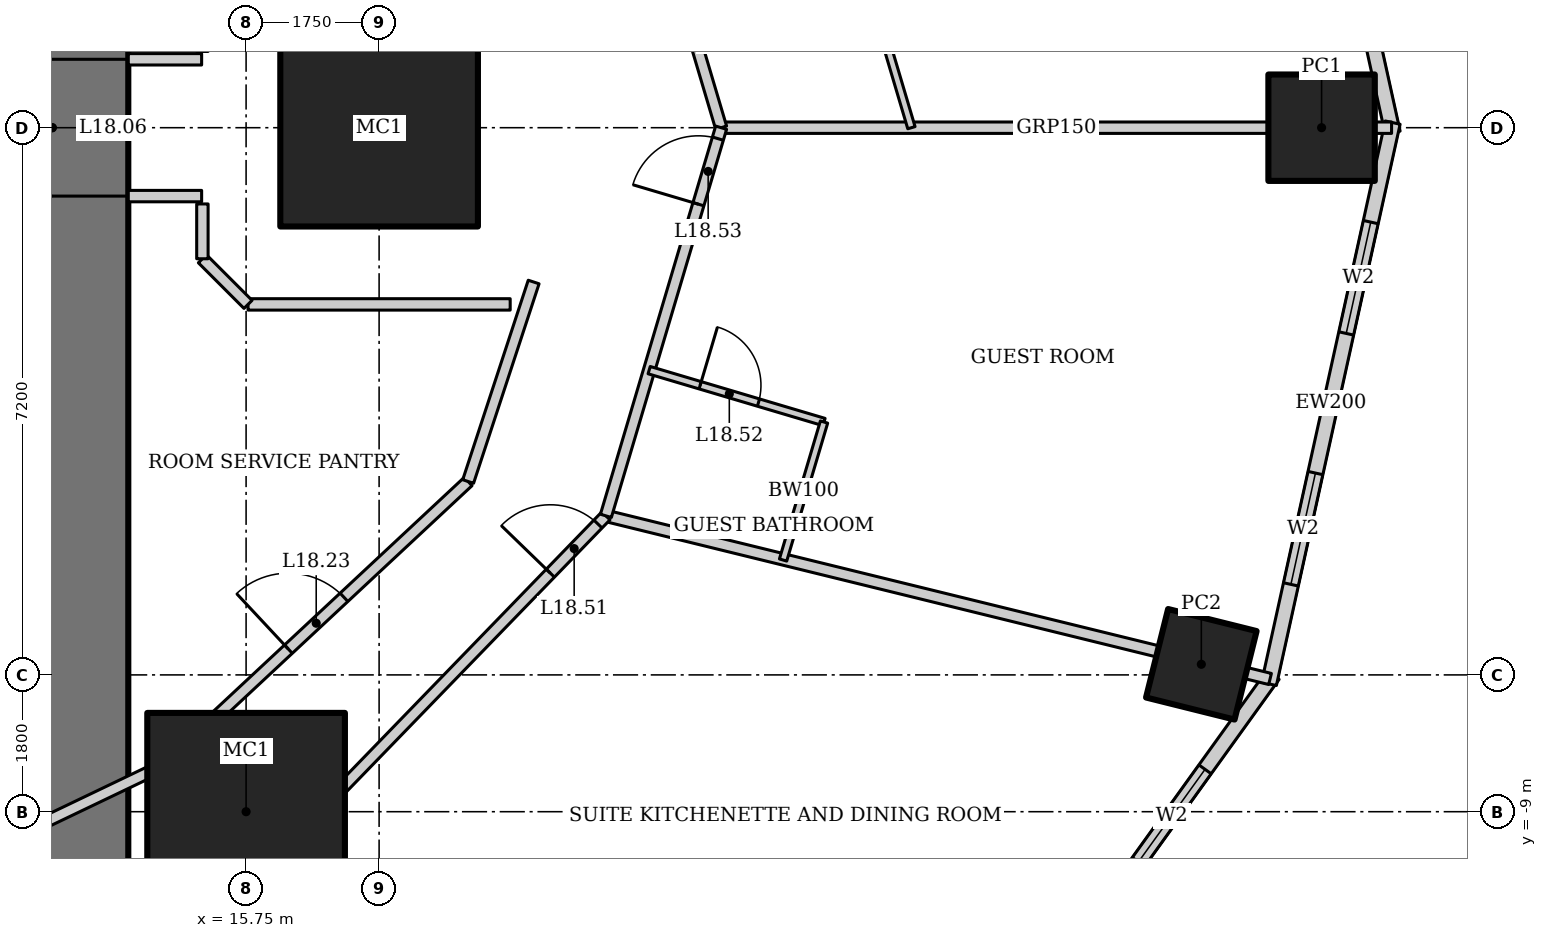
"""IFC4 building model, lengths in metres.
Left out: names, types, materials, properties, quantities, classifications, styles, units other than length and angle.
Written with IfcOpenShell. Run it as: python <this file> out.ifc"""

import sys

from ifc_helpers import new_model, si_unit, direction, frame, frame_2d, origin, origin_2d, place, context, subcontext, project, spatial, rectangle, hollow_rectangle, extrude, element, fill, save


model = new_model("IFC4")
c1 = context("Model", 3, precision=1e-05, world=origin(), true_north=direction((0.0, 1.0)))
c2 = subcontext(c1, "Body", "Model", "MODEL_VIEW")
j1 = project(units=[si_unit("LENGTHUNIT", "METRE"), si_unit("PLANEANGLEUNIT", "RADIAN")], contexts=[c1])
p1 = place(None, origin())
s1 = spatial("IfcSite", under=j1, at=p1, CompositionType="ELEMENT")
p2 = place(p1, origin())
s2 = spatial("IfcBuilding", under=s1, at=p2, CompositionType="ELEMENT")
p3 = place(p2, frame((0.0, 0.0, 80.2)))
s3 = spatial("IfcBuildingStorey", under=s2, at=p3, CompositionType="ELEMENT", Elevation=80.2)
for number, where, z_axis, x_axis in (
    (1, (17.5, 0.0, 0.0), (0.0, 0.0, 1.0), (1.0, 0.0, 0.0)),
    (2, (15.75, -9.0, 0.0), (0.0, 0.0, 1.0), (1.0, 0.0, 0.0)),
):
    element("IfcColumn", number, at=place(p3, frame(where, z_axis=z_axis, x_axis=x_axis)), inside=s3, PredefinedType="COLUMN", context=c2, shape_type="SweptSolid", body=[
        extrude(hollow_rectangle(XDim=2.6, YDim=2.6, WallThickness=0.13, at=origin_2d()), origin(), (0.0, 0.0, 1.0), 3.6),
    ])
p4 = place(p3, frame((29.9, 0.0, 0.0), z_axis=(0.0, 0.0, 1.0), x_axis=(1.0, 0.0, 0.0)))
e3 = element("IfcColumn", 3, at=p4, inside=s3, PredefinedType="COLUMN", context=c2, shape_type="SweptSolid", body=[
    extrude(hollow_rectangle(XDim=1.4, YDim=1.4, WallThickness=0.1, at=origin_2d()), origin(), (0.0, 0.0, 1.0), 3.6),
])
p5 = place(p3, frame((28.318, -7.06, 0.0), z_axis=(0.0, 0.0, 1.0), x_axis=(0.2419218956, 0.970295726276, 0.0)))
e4 = element("IfcColumn", 4, at=p5, inside=s3, PredefinedType="COLUMN", context=c2, shape_type="SweptSolid", body=[
    extrude(hollow_rectangle(XDim=1.2, YDim=1.2, WallThickness=0.1, at=origin_2d()), origin(), (0.0, 0.0, 1.0), 3.6),
])
p6 = place(p3, frame((13.2, -13.0, 0.0), z_axis=(0.0, 0.0, 1.0), x_axis=(0.0, 1.0, 0.0)))
e5 = element("IfcWall", 5, at=p6, inside=s3, PredefinedType="SHEAR", context=c2, shape_type="SweptSolid", body=[
    extrude(rectangle(XDim=26.0, YDim=2.0, at=frame_2d((13.0, 0.0))), origin(), (0.0, 0.0, 1.0), 3.6),
])
p7 = place(p6, frame((12.1, 0.0, 0.0)))
e6 = element("IfcOpeningElement", 6, at=p7, cuts=e5, PredefinedType="OPENING", context=c2, shape_type="SweptSolid", body=[
    extrude(rectangle(XDim=1.8, YDim=2.1, at=frame_2d((0.9, 1.05))), frame((0.0, 1.01, 0.0), z_axis=(0.0, -1.0, 0.0), x_axis=(1.0, 0.0, 0.0)), (0.0, 0.0, 1.0), 2.02),
])
p8 = place(p3, frame((30.835, -0.067, 0.0), z_axis=(0.0, 0.0, 1.0), x_axis=(-0.215238065514, 0.976561608478, 0.0)))
e7 = element("IfcWall", 7, at=p8, inside=s3, PredefinedType="SOLIDWALL", context=c2, shape_type="SweptSolid", body=[
    extrude(rectangle(XDim=7.562, YDim=0.2, at=frame_2d((3.781, 0.0))), origin(), (0.0, 0.0, 1.0), 3.45),
])
p9 = place(p8, frame((1.341, 0.0, 0.5)))
e8 = element("IfcOpeningElement", 8, at=p9, cuts=e7, PredefinedType="OPENING", context=c2, shape_type="SweptSolid", body=[
    extrude(rectangle(XDim=1.5, YDim=2.2, at=frame_2d((0.75, 1.1))), frame((0.0, 0.11, 0.0), z_axis=(0.0, -1.0, 0.0), x_axis=(1.0, 0.0, 0.0)), (0.0, 0.0, 1.0), 0.22),
])
p10 = place(p8, frame((4.722, 0.0, 0.5)))
e9 = element("IfcOpeningElement", 9, at=p10, cuts=e7, PredefinedType="OPENING", context=c2, shape_type="SweptSolid", body=[
    extrude(rectangle(XDim=1.5, YDim=2.2, at=frame_2d((0.75, 1.1))), frame((0.0, 0.11, 0.0), z_axis=(0.0, -1.0, 0.0), x_axis=(1.0, 0.0, 0.0)), (0.0, 0.0, 1.0), 0.22),
])
p11 = place(p3, frame((24.4, -13.957, 0.0), z_axis=(0.0, 0.0, 1.0), x_axis=(0.583937613703, 0.811798536155, 0.0)))
e10 = element("IfcWall", 10, at=p11, inside=s3, PredefinedType="SOLIDWALL", context=c2, shape_type="SweptSolid", body=[
    extrude(rectangle(XDim=8.323, YDim=0.2, at=frame_2d((4.162, 0.0))), origin(), (0.0, 0.0, 1.0), 3.45),
])
p12 = place(p11, frame((1.531, 0.0, 0.5)))
e11 = element("IfcOpeningElement", 11, at=p12, cuts=e10, PredefinedType="OPENING", context=c2, shape_type="SweptSolid", body=[
    extrude(rectangle(XDim=1.5, YDim=2.2, at=frame_2d((0.75, 1.1))), frame((0.0, 0.11, 0.0), z_axis=(0.0, -1.0, 0.0), x_axis=(1.0, 0.0, 0.0)), (0.0, 0.0, 1.0), 0.22),
])
p13 = place(p11, frame((5.292, 0.0, 0.5)))
e12 = element("IfcOpeningElement", 12, at=p13, cuts=e10, PredefinedType="OPENING", context=c2, shape_type="SweptSolid", body=[
    extrude(rectangle(XDim=1.5, YDim=2.2, at=frame_2d((0.75, 1.1))), frame((0.0, 0.11, 0.0), z_axis=(0.0, -1.0, 0.0), x_axis=(1.0, 0.0, 0.0)), (0.0, 0.0, 1.0), 0.22),
])
p14 = place(p3, frame((29.208, -7.318, 0.0), z_axis=(0.0, 0.0, 1.0), x_axis=(0.215238065514, 0.976561608478, 0.0)))
e13 = element("IfcWall", 13, at=p14, inside=s3, PredefinedType="SOLIDWALL", context=c2, shape_type="SweptSolid", body=[
    extrude(rectangle(XDim=7.562, YDim=0.2, at=frame_2d((3.781, 0.0))), origin(), (0.0, 0.0, 1.0), 3.45),
])
p15 = place(p14, frame((1.341, 0.0, 0.5)))
e14 = element("IfcOpeningElement", 14, at=p15, cuts=e13, PredefinedType="OPENING", context=c2, shape_type="SweptSolid", body=[
    extrude(rectangle(XDim=1.5, YDim=2.2, at=frame_2d((0.75, 1.1))), frame((0.0, 0.11, 0.0), z_axis=(0.0, -1.0, 0.0), x_axis=(1.0, 0.0, 0.0)), (0.0, 0.0, 1.0), 0.22),
])
p16 = place(p14, frame((4.722, 0.0, 0.5)))
e15 = element("IfcOpeningElement", 15, at=p16, cuts=e13, PredefinedType="OPENING", context=c2, shape_type="SweptSolid", body=[
    extrude(rectangle(XDim=1.5, YDim=2.2, at=frame_2d((0.75, 1.1))), frame((0.0, 0.11, 0.0), z_axis=(0.0, -1.0, 0.0), x_axis=(1.0, 0.0, 0.0)), (0.0, 0.0, 1.0), 0.22),
])
p17 = place(p3, frame((30.821, 0.0, 0.0), z_axis=(0.0, 0.0, 1.0), x_axis=(-1.0, 0.0, 0.0)))
e16 = element("IfcWall", 16, at=p17, inside=s3, PredefinedType="PARTITIONING", context=c2, shape_type="SweptSolid", body=[
    extrude(rectangle(XDim=8.821, YDim=0.15, at=frame_2d((4.41, 0.0))), origin(), (0.0, 0.0, 1.0), 2.528),
])
p18 = place(p3, frame((29.222, -7.254, 0.0), z_axis=(0.0, 0.0, 1.0), x_axis=(-0.971128703136, 0.238556160989, 0.0)))
e17 = element("IfcWall", 17, at=p18, inside=s3, PredefinedType="PARTITIONING", context=c2, shape_type="SweptSolid", body=[
    extrude(rectangle(XDim=8.998, YDim=0.15, at=frame_2d((4.499, 0.0))), origin(), (0.0, 0.0, 1.0), 2.333),
])
p19 = place(p3, frame((22.0, 0.0, 0.0), z_axis=(0.0, 0.0, 1.0), x_axis=(-0.284584469409, 0.95865096869, 0.0)))
e18 = element("IfcWall", 18, at=p19, inside=s3, PredefinedType="PARTITIONING", context=c2, shape_type="SweptSolid", body=[
    extrude(rectangle(XDim=5.327, YDim=0.15, at=frame_2d((2.664, 0.0))), origin(), (0.0, 0.0, 1.0), 3.45),
])
p20 = place(p3, frame((11.519, -11.928, 0.0), z_axis=(0.0, 0.0, 1.0), x_axis=(0.883334368785, 0.468743419071, 0.0)))
e19 = element("IfcWall", 19, at=p20, inside=s3, PredefinedType="PARTITIONING", context=c2, shape_type="SweptSolid", body=[
    extrude(rectangle(XDim=5.491, YDim=0.15, at=frame_2d((2.746, 0.0))), origin(), (0.0, 0.0, 1.0), 3.45),
])
p21 = place(p3, frame((16.369, -9.354, 0.0), z_axis=(0.0, 0.0, 1.0), x_axis=(0.695871090686, 0.71816671125, 0.0)))
e20 = element("IfcWall", 20, at=p21, inside=s3, PredefinedType="PARTITIONING", context=c2, shape_type="SweptSolid", body=[
    extrude(rectangle(XDim=5.913, YDim=0.15, at=frame_2d((2.957, 0.0))), origin(), (0.0, 0.0, 1.0), 3.45),
])
p22 = place(p21, frame((4.863, 0.0, 0.0)))
e21 = element("IfcOpeningElement", 21, at=p22, cuts=e20, PredefinedType="OPENING", context=c2, shape_type="SweptSolid", body=[
    extrude(rectangle(XDim=0.9, YDim=2.1, at=frame_2d((0.45, 1.05))), frame((0.0, 0.085, 0.0), z_axis=(0.0, -1.0, 0.0), x_axis=(1.0, 0.0, 0.0)), (0.0, 0.0, 1.0), 0.17),
])
p23 = place(p3, frame((20.484, -5.107, 0.0), z_axis=(0.0, 0.0, 1.0), x_axis=(0.284584469409, 0.95865096869, 0.0)))
e22 = element("IfcWall", 22, at=p23, inside=s3, PredefinedType="PARTITIONING", context=c2, shape_type="SweptSolid", body=[
    extrude(rectangle(XDim=5.327, YDim=0.15, at=frame_2d((2.664, 0.0))), origin(), (0.0, 0.0, 1.0), 3.45),
])
p24 = place(p23, frame((4.278, 0.0, 0.0)))
e23 = element("IfcOpeningElement", 23, at=p24, cuts=e22, PredefinedType="OPENING", context=c2, shape_type="SweptSolid", body=[
    extrude(rectangle(XDim=0.9, YDim=2.1, at=frame_2d((0.45, 1.05))), frame((0.0, 0.085, 0.0), z_axis=(0.0, -1.0, 0.0), x_axis=(1.0, 0.0, 0.0)), (0.0, 0.0, 1.0), 0.17),
])
p25 = place(p3, frame((10.177, -10.539, 0.0), z_axis=(0.0, 0.0, 1.0), x_axis=(0.901869692799, 0.43200816799, 0.0)))
e24 = element("IfcWall", 24, at=p25, inside=s3, PredefinedType="PARTITIONING", context=c2, shape_type="SweptSolid", body=[
    extrude(rectangle(XDim=4.986, YDim=0.15, at=frame_2d((2.493, 0.0))), origin(), (0.0, 0.0, 1.0), 3.45),
])
p26 = place(p3, frame((14.673, -8.385, 0.0), z_axis=(0.0, 0.0, 1.0), x_axis=(0.731260145007, 0.682098673452, 0.0)))
e25 = element("IfcWall", 25, at=p26, inside=s3, PredefinedType="PARTITIONING", context=c2, shape_type="SweptSolid", body=[
    extrude(rectangle(XDim=5.468, YDim=0.15, at=frame_2d((2.734, 0.0))), origin(), (0.0, 0.0, 1.0), 3.45),
])
p27 = place(p26, frame((2.234, 0.0, 0.0)))
e26 = element("IfcOpeningElement", 26, at=p27, cuts=e25, PredefinedType="OPENING", context=c2, shape_type="SweptSolid", body=[
    extrude(rectangle(XDim=1.0, YDim=2.1, at=frame_2d((0.5, 1.05))), frame((0.0, 0.085, 0.0), z_axis=(0.0, -1.0, 0.0), x_axis=(1.0, 0.0, 0.0)), (0.0, 0.0, 1.0), 0.17),
])
p28 = place(p3, frame((23.732, 2.6, 0.0), z_axis=(0.0, 0.0, 1.0), x_axis=(0.284514277473, -0.958671803025, 0.0)))
e27 = element("IfcWall", 27, at=p28, inside=s3, PredefinedType="PARTITIONING", context=c2, shape_type="SweptSolid", body=[
    extrude(rectangle(XDim=2.712, YDim=0.1, at=frame_2d((1.356, 0.0))), origin(), (0.0, 0.0, 1.0), 3.45),
])
p29 = place(p3, frame((23.171, -13.24, 0.0), z_axis=(0.0, 0.0, 1.0), x_axis=(-0.868243142124, 0.496138938357, 0.0)))
e28 = element("IfcWall", 28, at=p29, inside=s3, PredefinedType="PARTITIONING", context=c2, shape_type="SweptSolid", body=[
    extrude(rectangle(XDim=7.834, YDim=0.1, at=frame_2d((3.917, 0.0))), origin(), (0.0, 0.0, 1.0), 2.693),
])
p30 = place(p29, frame((3.467, 0.0, 0.0)))
e29 = element("IfcOpeningElement", 29, at=p30, cuts=e28, PredefinedType="OPENING", context=c2, shape_type="SweptSolid", body=[
    extrude(rectangle(XDim=0.9, YDim=2.1, at=frame_2d((0.45, 1.05))), frame((0.0, 0.06, 0.0), z_axis=(0.0, -1.0, 0.0), x_axis=(1.0, 0.0, 0.0)), (0.0, 0.0, 1.0), 0.12),
])
p31 = place(p3, frame((21.053, -3.19, 0.0), z_axis=(0.0, 0.0, 1.0), x_axis=(0.958667679126, -0.284528172593, 0.0)))
e30 = element("IfcWall", 30, at=p31, inside=s3, PredefinedType="PARTITIONING", context=c2, shape_type="SweptSolid", body=[
    extrude(rectangle(XDim=2.4, YDim=0.1, at=frame_2d((1.2, 0.0))), origin(), (0.0, 0.0, 1.0), 3.45),
])
p32 = place(p31, frame((0.7, 0.0, 0.0)))
e31 = element("IfcOpeningElement", 31, at=p32, cuts=e30, PredefinedType="OPENING", context=c2, shape_type="SweptSolid", body=[
    extrude(rectangle(XDim=0.8, YDim=2.1, at=frame_2d((0.4, 1.05))), frame((0.0, 0.06, 0.0), z_axis=(0.0, -1.0, 0.0), x_axis=(1.0, 0.0, 0.0)), (0.0, 0.0, 1.0), 0.12),
])
p33 = place(p3, frame((23.354, -3.873, 0.0), z_axis=(0.0, 0.0, 1.0), x_axis=(-0.284496480535, -0.958677084613, 0.0)))
e32 = element("IfcWall", 32, at=p33, inside=s3, PredefinedType="PARTITIONING", context=c2, shape_type="SweptSolid", body=[
    extrude(rectangle(XDim=1.894, YDim=0.1, at=frame_2d((0.947, 0.0))), origin(), (0.0, 0.0, 1.0), 3.45),
])
p34 = place(p3, frame((18.672, -4.655, 0.0), z_axis=(0.0, 0.0, 1.0), x_axis=(0.311929965981, 0.950105097515, 0.0)))
e33 = element("IfcWall", 33, at=p34, inside=s3, PredefinedType="PARTITIONING", context=c2, shape_type="SweptSolid", body=[
    extrude(rectangle(XDim=2.763, YDim=0.15, at=frame_2d((1.381, 0.0))), origin(), (0.0, 0.0, 1.0), 3.45),
])
for number, where, z_axis, x_axis in (
    (34, (14.2, -0.9, 0.0), (0.0, 0.0, 1.0), (1.0, 0.0, 0.0)),
    (35, (14.2, 0.9, 0.0), (0.0, 0.0, 1.0), (1.0, 0.0, 0.0)),
):
    element("IfcWall", number, at=place(p3, frame(where, z_axis=z_axis, x_axis=x_axis)), inside=s3, PredefinedType="PARTITIONING", context=c2, shape_type="SweptSolid", body=[
        extrude(rectangle(XDim=0.965, YDim=0.15, at=frame_2d((0.482, 0.0))), origin(), (0.0, 0.0, 1.0), 3.45),
    ])
p35 = place(p3, frame((19.225, -2.325, 0.0), z_axis=(0.0, 0.0, 1.0), x_axis=(-1.0, 0.0, 0.0)))
e36 = element("IfcWall", 36, at=p35, inside=s3, PredefinedType="PARTITIONING", context=c2, shape_type="SweptSolid", body=[
    extrude(rectangle(XDim=3.449, YDim=0.15, at=frame_2d((1.725, 0.0))), origin(), (0.0, 0.0, 1.0), 3.45),
])
p36 = place(p3, frame((15.775, -2.325, 0.0), z_axis=(0.0, 0.0, 1.0), x_axis=(-0.707106781187, 0.707106781187, 0.0)))
e37 = element("IfcWall", 37, at=p36, inside=s3, PredefinedType="PARTITIONING", context=c2, shape_type="SweptSolid", body=[
    extrude(rectangle(XDim=0.849, YDim=0.15, at=frame_2d((0.425, 0.0))), origin(), (0.0, 0.0, 1.0), 3.45),
])
p37 = place(p3, frame((15.175, -1.725, 0.0), z_axis=(0.0, 0.0, 1.0), x_axis=(0.0, 1.0, 0.0)))
e38 = element("IfcWall", 38, at=p37, inside=s3, PredefinedType="PARTITIONING", context=c2, shape_type="SweptSolid", body=[
    extrude(rectangle(XDim=0.721, YDim=0.15, at=frame_2d((0.361, 0.0))), origin(), (0.0, 0.0, 1.0), 3.45),
])
p38 = place(p13, origin())
e39 = element("IfcWindow", 39, at=p38, inside=s3, PartitioningType="SINGLE_PANEL", PredefinedType="WINDOW", context=c2, shape_type="SweptSolid", body=[
    extrude(rectangle(XDim=1.5, YDim=2.2, at=frame_2d((0.75, 1.1))), frame((0.0, 0.03, 0.0), z_axis=(0.0, -1.0, 0.0), x_axis=(1.0, 0.0, 0.0)), (0.0, 0.0, 1.0), 0.06),
])
fill(e12, e39)
p39 = place(p15, origin())
e40 = element("IfcWindow", 40, at=p39, inside=s3, PartitioningType="SINGLE_PANEL", PredefinedType="WINDOW", context=c2, shape_type="SweptSolid", body=[
    extrude(rectangle(XDim=1.5, YDim=2.2, at=frame_2d((0.75, 1.1))), frame((0.0, 0.03, 0.0), z_axis=(0.0, -1.0, 0.0), x_axis=(1.0, 0.0, 0.0)), (0.0, 0.0, 1.0), 0.06),
])
fill(e14, e40)
p40 = place(p16, origin())
e41 = element("IfcWindow", 41, at=p40, inside=s3, PartitioningType="SINGLE_PANEL", PredefinedType="WINDOW", context=c2, shape_type="SweptSolid", body=[
    extrude(rectangle(XDim=1.5, YDim=2.2, at=frame_2d((0.75, 1.1))), frame((0.0, 0.03, 0.0), z_axis=(0.0, -1.0, 0.0), x_axis=(1.0, 0.0, 0.0)), (0.0, 0.0, 1.0), 0.06),
])
fill(e15, e41)
p41 = place(p7, origin())
e42 = element("IfcDoor", 42, at=p41, inside=s3, OperationType="DOUBLE_DOOR_DOUBLE_SWING", PredefinedType="DOOR", context=c2, shape_type="SweptSolid", body=[
    extrude(rectangle(XDim=1.8, YDim=2.1, at=frame_2d((0.9, 1.05))), frame((0.0, 0.025, 0.0), z_axis=(0.0, -1.0, 0.0), x_axis=(1.0, 0.0, 0.0)), (0.0, 0.0, 1.0), 0.05),
])
fill(e6, e42)
p42 = place(p27, origin())
e43 = element("IfcDoor", 43, at=p42, inside=s3, OperationType="SINGLE_SWING_LEFT", PredefinedType="DOOR", context=c2, shape_type="SweptSolid", body=[
    extrude(rectangle(XDim=1.0, YDim=2.1, at=frame_2d((0.5, 1.05))), frame((0.0, 0.025, 0.0), z_axis=(0.0, -1.0, 0.0), x_axis=(1.0, 0.0, 0.0)), (0.0, 0.0, 1.0), 0.05),
])
fill(e26, e43)
p43 = place(p22, origin())
e44 = element("IfcDoor", 44, at=p43, inside=s3, OperationType="SINGLE_SWING_LEFT", PredefinedType="DOOR", context=c2, shape_type="SweptSolid", body=[
    extrude(rectangle(XDim=0.9, YDim=2.1, at=frame_2d((0.45, 1.05))), frame((0.0, 0.025, 0.0), z_axis=(0.0, -1.0, 0.0), x_axis=(1.0, 0.0, 0.0)), (0.0, 0.0, 1.0), 0.05),
])
fill(e21, e44)
p44 = place(p32, origin())
e45 = element("IfcDoor", 45, at=p44, inside=s3, OperationType="SINGLE_SWING_LEFT", PredefinedType="DOOR", context=c2, shape_type="SweptSolid", body=[
    extrude(rectangle(XDim=0.8, YDim=2.1, at=frame_2d((0.4, 1.05))), frame((0.0, 0.025, 0.0), z_axis=(0.0, -1.0, 0.0), x_axis=(1.0, 0.0, 0.0)), (0.0, 0.0, 1.0), 0.05),
])
fill(e31, e45)
p45 = place(p24, origin())
e46 = element("IfcDoor", 46, at=p45, inside=s3, OperationType="SINGLE_SWING_LEFT", PredefinedType="DOOR", context=c2, shape_type="SweptSolid", body=[
    extrude(rectangle(XDim=0.9, YDim=2.1, at=frame_2d((0.45, 1.05))), frame((0.0, 0.025, 0.0), z_axis=(0.0, -1.0, 0.0), x_axis=(1.0, 0.0, 0.0)), (0.0, 0.0, 1.0), 0.05),
])
fill(e23, e46)
save(model, sys.argv[1])
